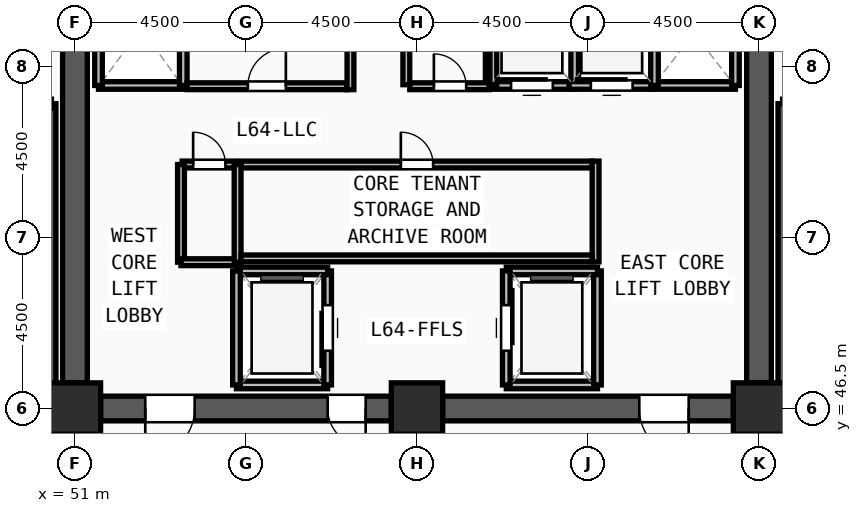
"""IFC4 building model, lengths in metres.
Left out: names, types, materials, properties, quantities, classifications, styles, units other than length and angle.
Written with IfcOpenShell. Run it as: python <this file> out.ifc"""

import sys

from ifc_helpers import new_model, si_unit, direction, frame, frame_2d, origin, origin_2d, place, context, subcontext, project, spatial, rectangle, extrude, source, transform, mapped, element, fill, save


model = new_model("IFC4")
c1 = context("Model", 3, precision=1e-05, world=origin(), true_north=direction((0.0, 1.0)))
c2 = subcontext(c1, "Body", "Model", "MODEL_VIEW")
j1 = project(units=[si_unit("LENGTHUNIT", "METRE"), si_unit("PLANEANGLEUNIT", "RADIAN")], contexts=[c1])
p1 = place(None, origin())
s1 = spatial("IfcSite", under=j1, at=p1, CompositionType="ELEMENT")
p2 = place(p1, origin())
s2 = spatial("IfcBuilding", under=s1, at=p2, CompositionType="ELEMENT")
p3 = place(p2, frame((0.0, 0.0, 247.5)))
s3 = spatial("IfcBuildingStorey", under=s2, at=p3, CompositionType="ELEMENT", Elevation=247.5)
m1 = source(origin(), c2, "Body", "SweptSolid", [
    extrude(rectangle(XDim=1.35, YDim=1.35, at=origin_2d()), origin(), (0.0, 0.0, 1.0), 3.75),
])
for number, where, z_axis, x_axis in (
    (1, (51.0, 46.5, 0.0), (0.0, 0.0, 1.0), (1.0, 0.0, 0.0)),
    (2, (60.0, 46.5, 0.0), (0.0, 0.0, 1.0), (1.0, 0.0, 0.0)),
    (3, (69.0, 46.5, 0.0), (0.0, 0.0, 1.0), (1.0, 0.0, 0.0)),
):
    element("IfcColumn", number, at=place(p3, frame(where, z_axis=z_axis, x_axis=x_axis)), inside=s3, PredefinedType="COLUMN", context=c2, shape_type="MappedRepresentation", body=[
        mapped(m1, transform((0.0, 0.0, 0.0), x_axis=(1.0, 0.0, 0.0), y_axis=(0.0, 1.0, 0.0), z_axis=(0.0, 0.0, 1.0), scale=1.0)),
    ])
p4 = place(p3, frame((69.0, 60.825, 0.0), z_axis=(0.0, 0.0, 1.0), x_axis=(0.0, -1.0, 0.0)))
e4 = element("IfcWall", 4, at=p4, inside=s3, PredefinedType="SHEAR", context=c2, shape_type="SweptSolid", body=[
    extrude(rectangle(XDim=13.65, YDim=0.65, at=frame_2d((6.825, 0.0))), origin(), (0.0, 0.0, 1.0), 3.57),
])
m2 = source(origin(), c2, "Body", "SweptSolid", [
    extrude(rectangle(XDim=1.2, YDim=2.2, at=frame_2d((0.6, 1.1))), frame((0.0, 0.335, 0.0), z_axis=(0.0, -1.0, 0.0), x_axis=(1.0, 0.0, 0.0)), (0.0, 0.0, 1.0), 0.67),
])
p5 = place(p4, frame((1.275, 0.0, 0.0)))
e5 = element("IfcOpeningElement", 5, at=p5, cuts=e4, PredefinedType="OPENING", context=c2, shape_type="MappedRepresentation", body=[
    mapped(m2, transform((0.0, 0.0, 0.0), x_axis=(1.0, 0.0, 0.0), y_axis=(0.0, 1.0, 0.0), z_axis=(0.0, 0.0, 1.0), scale=1.0)),
])
p6 = place(p3, frame((68.325, 46.5, 0.0), z_axis=(0.0, 0.0, 1.0), x_axis=(-1.0, 0.0, 0.0)))
e6 = element("IfcWall", 6, at=p6, inside=s3, PredefinedType="SHEAR", context=c2, shape_type="SweptSolid", body=[
    extrude(rectangle(XDim=7.65, YDim=0.65, at=frame_2d((3.825, 0.0))), origin(), (0.0, 0.0, 1.0), 3.57),
])
m3 = source(origin(), c2, "Body", "SweptSolid", [
    extrude(rectangle(XDim=1.3, YDim=2.2, at=frame_2d((0.65, 1.1))), frame((0.0, 0.335, 0.0), z_axis=(0.0, -1.0, 0.0), x_axis=(1.0, 0.0, 0.0)), (0.0, 0.0, 1.0), 0.67),
])
p7 = place(p6, frame((1.175, 0.0, 0.0)))
e7 = element("IfcOpeningElement", 7, at=p7, cuts=e6, PredefinedType="OPENING", context=c2, shape_type="MappedRepresentation", body=[
    mapped(m3, transform((0.0, 0.0, 0.0), x_axis=(1.0, 0.0, 0.0), y_axis=(0.0, 1.0, 0.0), z_axis=(0.0, 0.0, 1.0), scale=1.0)),
])
p8 = place(p3, frame((59.325, 46.5, 0.0), z_axis=(0.0, 0.0, 1.0), x_axis=(-1.0, 0.0, 0.0)))
e8 = element("IfcWall", 8, at=p8, inside=s3, PredefinedType="SHEAR", context=c2, shape_type="SweptSolid", body=[
    extrude(rectangle(XDim=7.65, YDim=0.65, at=frame_2d((3.825, 0.0))), origin(), (0.0, 0.0, 1.0), 3.57),
])
p9 = place(p8, frame((5.175, 0.0, 0.0)))
e9 = element("IfcOpeningElement", 9, at=p9, cuts=e8, PredefinedType="OPENING", context=c2, shape_type="MappedRepresentation", body=[
    mapped(m3, transform((0.0, 0.0, 0.0), x_axis=(1.0, 0.0, 0.0), y_axis=(0.0, 1.0, 0.0), z_axis=(0.0, 0.0, 1.0), scale=1.0)),
])
m4 = source(origin(), c2, "Body", "SweptSolid", [
    extrude(rectangle(XDim=1.0, YDim=2.2, at=frame_2d((0.5, 1.1))), frame((0.0, 0.335, 0.0), z_axis=(0.0, -1.0, 0.0), x_axis=(1.0, 0.0, 0.0)), (0.0, 0.0, 1.0), 0.67),
])
p10 = place(p8, frame((0.675, 0.0, 0.0)))
e10 = element("IfcOpeningElement", 10, at=p10, cuts=e8, PredefinedType="OPENING", context=c2, shape_type="MappedRepresentation", body=[
    mapped(m4, transform((0.0, 0.0, 0.0), x_axis=(1.0, 0.0, 0.0), y_axis=(0.0, 1.0, 0.0), z_axis=(0.0, 0.0, 1.0), scale=1.0)),
])
p11 = place(p3, frame((51.0, 47.175, 0.0), z_axis=(0.0, 0.0, 1.0), x_axis=(0.0, 1.0, 0.0)))
e11 = element("IfcWall", 11, at=p11, inside=s3, PredefinedType="SHEAR", context=c2, shape_type="SweptSolid", body=[
    extrude(rectangle(XDim=13.65, YDim=0.65, at=frame_2d((6.825, 0.0))), origin(), (0.0, 0.0, 1.0), 3.57),
])
for number, where, z_axis, x_axis in (
    (12, (50.38, 46.7, 0.0), (0.0, 0.0, 1.0), (0.0, 1.0, 0.0)),
    (13, (69.62, 54.52, 0.0), (0.0, 0.0, 1.0), (0.0, -1.0, 0.0)),
):
    element("IfcWall", number, at=place(p3, frame(where, z_axis=z_axis, x_axis=x_axis)), inside=s3, PredefinedType="SOLIDWALL", context=c2, shape_type="SweptSolid", body=[
        extrude(rectangle(XDim=7.82, YDim=0.24, at=frame_2d((3.91, 0.0))), origin(), (0.0, 0.0, 1.0), 3.57),
    ])
p12 = place(p3, frame((55.25, 47.12, 0.0), z_axis=(0.0, 0.0, 1.0), x_axis=(1.0, 0.0, 0.0)))
e14 = element("IfcWall", 14, at=p12, inside=s3, PredefinedType="SOLIDWALL", context=c2, shape_type="SweptSolid", body=[
    extrude(rectangle(XDim=2.4, YDim=0.2, at=frame_2d((1.2, 0.0))), origin(), (0.0, 0.0, 1.0), 3.57),
])
p13 = place(p3, frame((57.65, 47.12, 0.0), z_axis=(0.0, 0.0, 1.0), x_axis=(0.0, 1.0, 0.0)))
e15 = element("IfcWall", 15, at=p13, inside=s3, PredefinedType="SOLIDWALL", context=c2, shape_type="SweptSolid", body=[
    extrude(rectangle(XDim=3.0, YDim=0.2, at=frame_2d((1.5, 0.0))), origin(), (0.0, 0.0, 1.0), 3.57),
])
m5 = source(origin(), c2, "Body", "SweptSolid", [
    extrude(rectangle(XDim=1.2, YDim=2.3, at=frame_2d((0.6, 1.15))), frame((0.0, 0.11, 0.0), z_axis=(0.0, -1.0, 0.0), x_axis=(1.0, 0.0, 0.0)), (0.0, 0.0, 1.0), 0.22),
])
p14 = place(p13, frame((0.9, 0.0, 0.0)))
e16 = element("IfcOpeningElement", 16, at=p14, cuts=e15, PredefinedType="OPENING", context=c2, shape_type="MappedRepresentation", body=[
    mapped(m5, transform((0.0, 0.0, 0.0), x_axis=(1.0, 0.0, 0.0), y_axis=(0.0, 1.0, 0.0), z_axis=(0.0, 0.0, 1.0), scale=1.0)),
])
p15 = place(p3, frame((57.65, 50.12, 0.0), z_axis=(0.0, 0.0, 1.0), x_axis=(-1.0, 0.0, 0.0)))
e17 = element("IfcWall", 17, at=p15, inside=s3, PredefinedType="SOLIDWALL", context=c2, shape_type="SweptSolid", body=[
    extrude(rectangle(XDim=2.4, YDim=0.2, at=frame_2d((1.2, 0.0))), origin(), (0.0, 0.0, 1.0), 3.57),
])
p16 = place(p3, frame((55.25, 50.12, 0.0), z_axis=(0.0, 0.0, 1.0), x_axis=(0.0, -1.0, 0.0)))
e18 = element("IfcWall", 18, at=p16, inside=s3, PredefinedType="SOLIDWALL", context=c2, shape_type="SweptSolid", body=[
    extrude(rectangle(XDim=3.0, YDim=0.2, at=frame_2d((1.5, 0.0))), origin(), (0.0, 0.0, 1.0), 3.57),
])
p17 = place(p3, frame((62.35, 47.12, 0.0), z_axis=(0.0, 0.0, 1.0), x_axis=(1.0, 0.0, 0.0)))
e19 = element("IfcWall", 19, at=p17, inside=s3, PredefinedType="SOLIDWALL", context=c2, shape_type="SweptSolid", body=[
    extrude(rectangle(XDim=2.4, YDim=0.2, at=frame_2d((1.2, 0.0))), origin(), (0.0, 0.0, 1.0), 3.57),
])
p18 = place(p3, frame((64.75, 47.12, 0.0), z_axis=(0.0, 0.0, 1.0), x_axis=(0.0, 1.0, 0.0)))
e20 = element("IfcWall", 20, at=p18, inside=s3, PredefinedType="SOLIDWALL", context=c2, shape_type="SweptSolid", body=[
    extrude(rectangle(XDim=3.0, YDim=0.2, at=frame_2d((1.5, 0.0))), origin(), (0.0, 0.0, 1.0), 3.57),
])
p19 = place(p3, frame((64.75, 50.12, 0.0), z_axis=(0.0, 0.0, 1.0), x_axis=(-1.0, 0.0, 0.0)))
e21 = element("IfcWall", 21, at=p19, inside=s3, PredefinedType="SOLIDWALL", context=c2, shape_type="SweptSolid", body=[
    extrude(rectangle(XDim=2.4, YDim=0.2, at=frame_2d((1.2, 0.0))), origin(), (0.0, 0.0, 1.0), 3.57),
])
p20 = place(p3, frame((62.35, 50.12, 0.0), z_axis=(0.0, 0.0, 1.0), x_axis=(0.0, -1.0, 0.0)))
e22 = element("IfcWall", 22, at=p20, inside=s3, PredefinedType="SOLIDWALL", context=c2, shape_type="SweptSolid", body=[
    extrude(rectangle(XDim=3.0, YDim=0.2, at=frame_2d((1.5, 0.0))), origin(), (0.0, 0.0, 1.0), 3.57),
])
p21 = place(p20, frame((0.9, 0.0, 0.0)))
e23 = element("IfcOpeningElement", 23, at=p21, cuts=e22, PredefinedType="OPENING", context=c2, shape_type="MappedRepresentation", body=[
    mapped(m5, transform((0.0, 0.0, 0.0), x_axis=(1.0, 0.0, 0.0), y_axis=(0.0, 1.0, 0.0), z_axis=(0.0, 0.0, 1.0), scale=1.0)),
])
p22 = place(p3, frame((51.62, 55.0, 0.0), z_axis=(0.0, 0.0, 1.0), x_axis=(1.0, 0.0, 0.0)))
e24 = element("IfcWall", 24, at=p22, inside=s3, PredefinedType="SOLIDWALL", context=c2, shape_type="SweptSolid", body=[
    extrude(rectangle(XDim=2.23, YDim=0.2, at=frame_2d((1.115, 0.0))), origin(), (0.0, 0.0, 1.0), 3.57),
])
for number, where, z_axis, x_axis in (
    (25, (53.85, 55.0, 0.0), (0.0, 0.0, 1.0), (0.0, 1.0, 0.0)),
    (26, (51.62, 58.0, 0.0), (0.0, 0.0, 1.0), (0.0, -1.0, 0.0)),
):
    element("IfcWall", number, at=place(p3, frame(where, z_axis=z_axis, x_axis=x_axis)), inside=s3, PredefinedType="SOLIDWALL", context=c2, shape_type="SweptSolid", body=[
        extrude(rectangle(XDim=3.0, YDim=0.2, at=frame_2d((1.5, 0.0))), origin(), (0.0, 0.0, 1.0), 3.57),
    ])
p23 = place(p3, frame((66.2, 55.0, 0.0), z_axis=(0.0, 0.0, 1.0), x_axis=(1.0, 0.0, 0.0)))
e27 = element("IfcWall", 27, at=p23, inside=s3, PredefinedType="SOLIDWALL", context=c2, shape_type="SweptSolid", body=[
    extrude(rectangle(XDim=2.18, YDim=0.2, at=frame_2d((1.09, 0.0))), origin(), (0.0, 0.0, 1.0), 3.57),
])
p24 = place(p3, frame((68.38, 55.0, 0.0), z_axis=(0.0, 0.0, 1.0), x_axis=(0.0, 1.0, 0.0)))
e28 = element("IfcWall", 28, at=p24, inside=s3, PredefinedType="SOLIDWALL", context=c2, shape_type="SweptSolid", body=[
    extrude(rectangle(XDim=2.75, YDim=0.2, at=frame_2d((1.375, 0.0))), origin(), (0.0, 0.0, 1.0), 3.57),
])
p25 = place(p3, frame((61.9, 55.0, 0.0), z_axis=(0.0, 0.0, 1.0), x_axis=(1.0, 0.0, 0.0)))
e29 = element("IfcWall", 29, at=p25, inside=s3, PredefinedType="SOLIDWALL", context=c2, shape_type="SweptSolid", body=[
    extrude(rectangle(XDim=2.25, YDim=0.2, at=frame_2d((1.125, 0.0))), origin(), (0.0, 0.0, 1.0), 3.57),
])
m6 = source(origin(), c2, "Body", "SweptSolid", [
    extrude(rectangle(XDim=1.1, YDim=2.2, at=frame_2d((0.55, 1.1))), frame((0.0, 0.11, 0.0), z_axis=(0.0, -1.0, 0.0), x_axis=(1.0, 0.0, 0.0)), (0.0, 0.0, 1.0), 0.22),
])
p26 = place(p25, frame((0.575, 0.0, 0.0)))
e30 = element("IfcOpeningElement", 30, at=p26, cuts=e29, PredefinedType="OPENING", context=c2, shape_type="MappedRepresentation", body=[
    mapped(m6, transform((0.0, 0.0, 0.0), x_axis=(1.0, 0.0, 0.0), y_axis=(0.0, 1.0, 0.0), z_axis=(0.0, 0.0, 1.0), scale=1.0)),
])
for number, where, z_axis, x_axis in (
    (31, (64.15, 55.0, 0.0), (0.0, 0.0, 1.0), (0.0, 1.0, 0.0)),
    (32, (61.9, 57.6, 0.0), (0.0, 0.0, 1.0), (0.0, -1.0, 0.0)),
):
    element("IfcWall", number, at=place(p3, frame(where, z_axis=z_axis, x_axis=x_axis)), inside=s3, PredefinedType="SOLIDWALL", context=c2, shape_type="SweptSolid", body=[
        extrude(rectangle(XDim=2.6, YDim=0.2, at=frame_2d((1.3, 0.0))), origin(), (0.0, 0.0, 1.0), 3.57),
    ])
p27 = place(p3, frame((64.0, 55.0, 0.0), z_axis=(0.0, 0.0, 1.0), x_axis=(1.0, 0.0, 0.0)))
e33 = element("IfcWall", 33, at=p27, inside=s3, PredefinedType="SOLIDWALL", context=c2, shape_type="SweptSolid", body=[
    extrude(rectangle(XDim=2.25, YDim=0.2, at=frame_2d((1.125, 0.0))), origin(), (0.0, 0.0, 1.0), 3.57),
])
p28 = place(p27, frame((0.575, 0.0, 0.0)))
e34 = element("IfcOpeningElement", 34, at=p28, cuts=e33, PredefinedType="OPENING", context=c2, shape_type="MappedRepresentation", body=[
    mapped(m6, transform((0.0, 0.0, 0.0), x_axis=(1.0, 0.0, 0.0), y_axis=(0.0, 1.0, 0.0), z_axis=(0.0, 0.0, 1.0), scale=1.0)),
])
p29 = place(p3, frame((66.25, 55.0, 0.0), z_axis=(0.0, 0.0, 1.0), x_axis=(0.0, 1.0, 0.0)))
e35 = element("IfcWall", 35, at=p29, inside=s3, PredefinedType="SOLIDWALL", context=c2, shape_type="SweptSolid", body=[
    extrude(rectangle(XDim=2.6, YDim=0.2, at=frame_2d((1.3, 0.0))), origin(), (0.0, 0.0, 1.0), 3.57),
])
p30 = place(p3, frame((55.37, 52.92, 0.0), z_axis=(0.0, 0.0, 1.0), x_axis=(1.0, 0.0, 0.0)))
e36 = element("IfcWall", 36, at=p30, inside=s3, PredefinedType="PARTITIONING", context=c2, shape_type="SweptSolid", body=[
    extrude(rectangle(XDim=9.24, YDim=0.18, at=frame_2d((4.62, 0.0))), origin(), (0.0, 0.0, 1.0), 3.57),
])
m7 = source(origin(), c2, "Body", "SweptSolid", [
    extrude(rectangle(XDim=0.85, YDim=2.1, at=frame_2d((0.425, 1.05))), frame((0.0, 0.1, 0.0), z_axis=(0.0, -1.0, 0.0), x_axis=(1.0, 0.0, 0.0)), (0.0, 0.0, 1.0), 0.2),
])
p31 = place(p30, frame((4.205, 0.0, 0.0)))
e37 = element("IfcOpeningElement", 37, at=p31, cuts=e36, PredefinedType="OPENING", context=c2, shape_type="MappedRepresentation", body=[
    mapped(m7, transform((0.0, 0.0, 0.0), x_axis=(1.0, 0.0, 0.0), y_axis=(0.0, 1.0, 0.0), z_axis=(0.0, 0.0, 1.0), scale=1.0)),
])
p32 = place(p3, frame((53.95, 54.98, 0.0), z_axis=(0.0, 0.0, 1.0), x_axis=(1.0, 0.0, 0.0)))
e38 = element("IfcWall", 38, at=p32, inside=s3, PredefinedType="PARTITIONING", context=c2, shape_type="SweptSolid", body=[
    extrude(rectangle(XDim=4.21, YDim=0.18, at=frame_2d((2.105, 0.0))), origin(), (0.0, 0.0, 1.0), 3.57),
])
m8 = source(origin(), c2, "Body", "SweptSolid", [
    extrude(rectangle(XDim=1.0, YDim=2.2, at=frame_2d((0.5, 1.1))), frame((0.0, 0.1, 0.0), z_axis=(0.0, -1.0, 0.0), x_axis=(1.0, 0.0, 0.0)), (0.0, 0.0, 1.0), 0.2),
])
p33 = place(p32, frame((1.6, 0.0, 0.0)))
e39 = element("IfcOpeningElement", 39, at=p33, cuts=e38, PredefinedType="OPENING", context=c2, shape_type="MappedRepresentation", body=[
    mapped(m8, transform((0.0, 0.0, 0.0), x_axis=(1.0, 0.0, 0.0), y_axis=(0.0, 1.0, 0.0), z_axis=(0.0, 0.0, 1.0), scale=1.0)),
])
p34 = place(p3, frame((59.81, 54.98, 0.0), z_axis=(0.0, 0.0, 1.0), x_axis=(1.0, 0.0, 0.0)))
e40 = element("IfcWall", 40, at=p34, inside=s3, PredefinedType="PARTITIONING", context=c2, shape_type="SweptSolid", body=[
    extrude(rectangle(XDim=2.09, YDim=0.18, at=frame_2d((1.045, 0.0))), origin(), (0.0, 0.0, 1.0), 3.57),
])
p35 = place(p34, frame((0.635, 0.0, 0.0)))
e41 = element("IfcOpeningElement", 41, at=p35, cuts=e40, PredefinedType="OPENING", context=c2, shape_type="MappedRepresentation", body=[
    mapped(m7, transform((0.0, 0.0, 0.0), x_axis=(1.0, 0.0, 0.0), y_axis=(0.0, 1.0, 0.0), z_axis=(0.0, 0.0, 1.0), scale=1.0)),
])
p36 = place(p3, frame((53.82, 52.92, 0.0), z_axis=(0.0, 0.0, 1.0), x_axis=(1.0, 0.0, 0.0)))
e42 = element("IfcWall", 42, at=p36, inside=s3, PredefinedType="PARTITIONING", context=c2, shape_type="SweptSolid", body=[
    extrude(rectangle(XDim=1.43, YDim=0.18, at=frame_2d((0.715, 0.0))), origin(), (0.0, 0.0, 1.0), 3.57),
])
p37 = place(p36, frame((0.29, 0.0, 0.0)))
e43 = element("IfcOpeningElement", 43, at=p37, cuts=e42, PredefinedType="OPENING", context=c2, shape_type="MappedRepresentation", body=[
    mapped(m7, transform((0.0, 0.0, 0.0), x_axis=(1.0, 0.0, 0.0), y_axis=(0.0, 1.0, 0.0), z_axis=(0.0, 0.0, 1.0), scale=1.0)),
])
for number, where, z_axis, x_axis in (
    (44, (59.72, 55.02, 0.0), (0.0, 0.0, 1.0), (0.0, 1.0, 0.0)),
    (45, (62.01, 55.02, 0.0), (0.0, 0.0, 1.0), (0.0, 1.0, 0.0)),
):
    element("IfcWall", number, at=place(p3, frame(where, z_axis=z_axis, x_axis=x_axis)), inside=s3, PredefinedType="PARTITIONING", context=c2, shape_type="SweptSolid", body=[
        extrude(rectangle(XDim=2.88, YDim=0.18, at=frame_2d((1.44, 0.0))), origin(), (0.0, 0.0, 1.0), 3.57),
    ])
p38 = place(p3, frame((53.79, 50.35, 0.0), z_axis=(0.0, 0.0, 1.0), x_axis=(0.0, 1.0, 0.0)))
e46 = element("IfcWall", 46, at=p38, inside=s3, PredefinedType="PARTITIONING", context=c2, shape_type="SweptSolid", body=[
    extrude(rectangle(XDim=2.57, YDim=0.18, at=frame_2d((1.285, 0.0))), origin(), (0.0, 0.0, 1.0), 3.57),
])
p39 = place(p3, frame((53.79, 50.35, 0.0), z_axis=(0.0, 0.0, 1.0), x_axis=(1.0, 0.0, 0.0)))
e47 = element("IfcWall", 47, at=p39, inside=s3, PredefinedType="PARTITIONING", context=c2, shape_type="SweptSolid", body=[
    extrude(rectangle(XDim=1.49, YDim=0.18, at=frame_2d((0.745, 0.0))), origin(), (0.0, 0.0, 1.0), 3.57),
])
p40 = place(p3, frame((55.28, 50.35, 0.0), z_axis=(0.0, 0.0, 1.0), x_axis=(0.0, 1.0, 0.0)))
e48 = element("IfcWall", 48, at=p40, inside=s3, PredefinedType="PARTITIONING", context=c2, shape_type="SweptSolid", body=[
    extrude(rectangle(XDim=2.57, YDim=0.18, at=frame_2d((1.285, 0.0))), origin(), (0.0, 0.0, 1.0), 3.57),
])
p41 = place(p3, frame((64.7, 50.36, 0.0), z_axis=(0.0, 0.0, 1.0), x_axis=(0.0, 1.0, 0.0)))
e49 = element("IfcWall", 49, at=p41, inside=s3, PredefinedType="PARTITIONING", context=c2, shape_type="SweptSolid", body=[
    extrude(rectangle(XDim=2.65, YDim=0.18, at=frame_2d((1.325, 0.0))), origin(), (0.0, 0.0, 1.0), 3.57),
])
p42 = place(p3, frame((55.37, 50.45, 0.0), z_axis=(0.0, 0.0, 1.0), x_axis=(1.0, 0.0, 0.0)))
e50 = element("IfcWall", 50, at=p42, inside=s3, PredefinedType="PARTITIONING", context=c2, shape_type="SweptSolid", body=[
    extrude(rectangle(XDim=9.24, YDim=0.18, at=frame_2d((4.62, 0.0))), origin(), (0.0, 0.0, 1.0), 3.57),
])
p43 = place(p3, frame((58.25, 54.89, 0.0), z_axis=(0.0, 0.0, 1.0), x_axis=(0.0, 1.0, 0.0)))
e51 = element("IfcWall", 51, at=p43, inside=s3, PredefinedType="PARTITIONING", context=c2, shape_type="SweptSolid", body=[
    extrude(rectangle(XDim=3.02, YDim=0.18, at=frame_2d((1.51, 0.0))), origin(), (0.0, 0.0, 1.0), 3.57),
])
m9 = source(origin(), c2, "Body", "SweptSolid", [
    extrude(rectangle(XDim=1.3, YDim=2.2, at=frame_2d((0.65, 1.1))), frame((0.0, 0.025, 0.0), z_axis=(0.0, -1.0, 0.0), x_axis=(1.0, 0.0, 0.0)), (0.0, 0.0, 1.0), 0.05),
])
p44 = place(p9, origin())
e52 = element("IfcDoor", 52, at=p44, inside=s3, OperationType="SINGLE_SWING_RIGHT", PredefinedType="DOOR", context=c2, shape_type="MappedRepresentation", body=[
    mapped(m9, transform((0.0, 0.0, 0.0), x_axis=(1.0, 0.0, 0.0), y_axis=(0.0, 1.0, 0.0), z_axis=(0.0, 0.0, 1.0), scale=1.0)),
])
fill(e9, e52)
m10 = source(origin(), c2, "Body", "SweptSolid", [
    extrude(rectangle(XDim=1.0, YDim=2.2, at=frame_2d((0.5, 1.1))), frame((0.0, 0.025, 0.0), z_axis=(0.0, -1.0, 0.0), x_axis=(1.0, 0.0, 0.0)), (0.0, 0.0, 1.0), 0.05),
])
p45 = place(p10, origin())
e53 = element("IfcDoor", 53, at=p45, inside=s3, OperationType="SINGLE_SWING_LEFT", PredefinedType="DOOR", context=c2, shape_type="MappedRepresentation", body=[
    mapped(m10, transform((0.0, 0.0, 0.0), x_axis=(1.0, 0.0, 0.0), y_axis=(0.0, 1.0, 0.0), z_axis=(0.0, 0.0, 1.0), scale=1.0)),
])
fill(e10, e53)
p46 = place(p7, origin())
e54 = element("IfcDoor", 54, at=p46, inside=s3, OperationType="SINGLE_SWING_LEFT", PredefinedType="DOOR", context=c2, shape_type="MappedRepresentation", body=[
    mapped(m9, transform((0.0, 0.0, 0.0), x_axis=(1.0, 0.0, 0.0), y_axis=(0.0, 1.0, 0.0), z_axis=(0.0, 0.0, 1.0), scale=1.0)),
])
fill(e7, e54)
m11 = source(origin(), c2, "Body", "SweptSolid", [
    extrude(rectangle(XDim=1.2, YDim=2.3, at=frame_2d((0.6, 1.15))), frame((0.0, 0.025, 0.0), z_axis=(0.0, -1.0, 0.0), x_axis=(1.0, 0.0, 0.0)), (0.0, 0.0, 1.0), 0.05),
])
p47 = place(p14, origin())
e55 = element("IfcDoor", 55, at=p47, inside=s3, OperationType="SLIDING_TO_LEFT", PredefinedType="DOOR", context=c2, shape_type="MappedRepresentation", body=[
    mapped(m11, transform((0.0, 0.0, 0.0), x_axis=(1.0, 0.0, 0.0), y_axis=(0.0, 1.0, 0.0), z_axis=(0.0, 0.0, 1.0), scale=1.0)),
])
fill(e16, e55)
p48 = place(p21, origin())
e56 = element("IfcDoor", 56, at=p48, inside=s3, OperationType="SLIDING_TO_LEFT", PredefinedType="DOOR", context=c2, shape_type="MappedRepresentation", body=[
    mapped(m11, transform((0.0, 0.0, 0.0), x_axis=(1.0, 0.0, 0.0), y_axis=(0.0, 1.0, 0.0), z_axis=(0.0, 0.0, 1.0), scale=1.0)),
])
fill(e23, e56)
m12 = source(origin(), c2, "Body", "SweptSolid", [
    extrude(rectangle(XDim=1.1, YDim=2.2, at=frame_2d((0.55, 1.1))), frame((0.0, 0.025, 0.0), z_axis=(0.0, -1.0, 0.0), x_axis=(1.0, 0.0, 0.0)), (0.0, 0.0, 1.0), 0.05),
])
p49 = place(p26, origin())
e57 = element("IfcDoor", 57, at=p49, inside=s3, OperationType="SLIDING_TO_LEFT", PredefinedType="DOOR", context=c2, shape_type="MappedRepresentation", body=[
    mapped(m12, transform((0.0, 0.0, 0.0), x_axis=(1.0, 0.0, 0.0), y_axis=(0.0, 1.0, 0.0), z_axis=(0.0, 0.0, 1.0), scale=1.0)),
])
fill(e30, e57)
p50 = place(p28, origin())
e58 = element("IfcDoor", 58, at=p50, inside=s3, OperationType="SLIDING_TO_LEFT", PredefinedType="DOOR", context=c2, shape_type="MappedRepresentation", body=[
    mapped(m12, transform((0.0, 0.0, 0.0), x_axis=(1.0, 0.0, 0.0), y_axis=(0.0, 1.0, 0.0), z_axis=(0.0, 0.0, 1.0), scale=1.0)),
])
fill(e34, e58)
m13 = source(origin(), c2, "Body", "SweptSolid", [
    extrude(rectangle(XDim=0.85, YDim=2.1, at=frame_2d((0.425, 1.05))), frame((0.0, 0.025, 0.0), z_axis=(0.0, -1.0, 0.0), x_axis=(1.0, 0.0, 0.0)), (0.0, 0.0, 1.0), 0.05),
])
p51 = place(p31, origin())
e59 = element("IfcDoor", 59, at=p51, inside=s3, OperationType="SINGLE_SWING_LEFT", PredefinedType="DOOR", context=c2, shape_type="MappedRepresentation", body=[
    mapped(m13, transform((0.0, 0.0, 0.0), x_axis=(1.0, 0.0, 0.0), y_axis=(0.0, 1.0, 0.0), z_axis=(0.0, 0.0, 1.0), scale=1.0)),
])
fill(e37, e59)
p52 = place(p33, origin())
e60 = element("IfcDoor", 60, at=p52, inside=s3, OperationType="SINGLE_SWING_RIGHT", PredefinedType="DOOR", context=c2, shape_type="MappedRepresentation", body=[
    mapped(m10, transform((0.0, 0.0, 0.0), x_axis=(1.0, 0.0, 0.0), y_axis=(0.0, 1.0, 0.0), z_axis=(0.0, 0.0, 1.0), scale=1.0)),
])
fill(e39, e60)
p53 = place(p35, origin())
e61 = element("IfcDoor", 61, at=p53, inside=s3, OperationType="SINGLE_SWING_LEFT", PredefinedType="DOOR", context=c2, shape_type="MappedRepresentation", body=[
    mapped(m13, transform((0.0, 0.0, 0.0), x_axis=(1.0, 0.0, 0.0), y_axis=(0.0, 1.0, 0.0), z_axis=(0.0, 0.0, 1.0), scale=1.0)),
])
fill(e41, e61)
p54 = place(p37, origin())
e62 = element("IfcDoor", 62, at=p54, inside=s3, OperationType="SINGLE_SWING_LEFT", PredefinedType="DOOR", context=c2, shape_type="MappedRepresentation", body=[
    mapped(m13, transform((0.0, 0.0, 0.0), x_axis=(1.0, 0.0, 0.0), y_axis=(0.0, 1.0, 0.0), z_axis=(0.0, 0.0, 1.0), scale=1.0)),
])
fill(e43, e62)
save(model, sys.argv[1])
